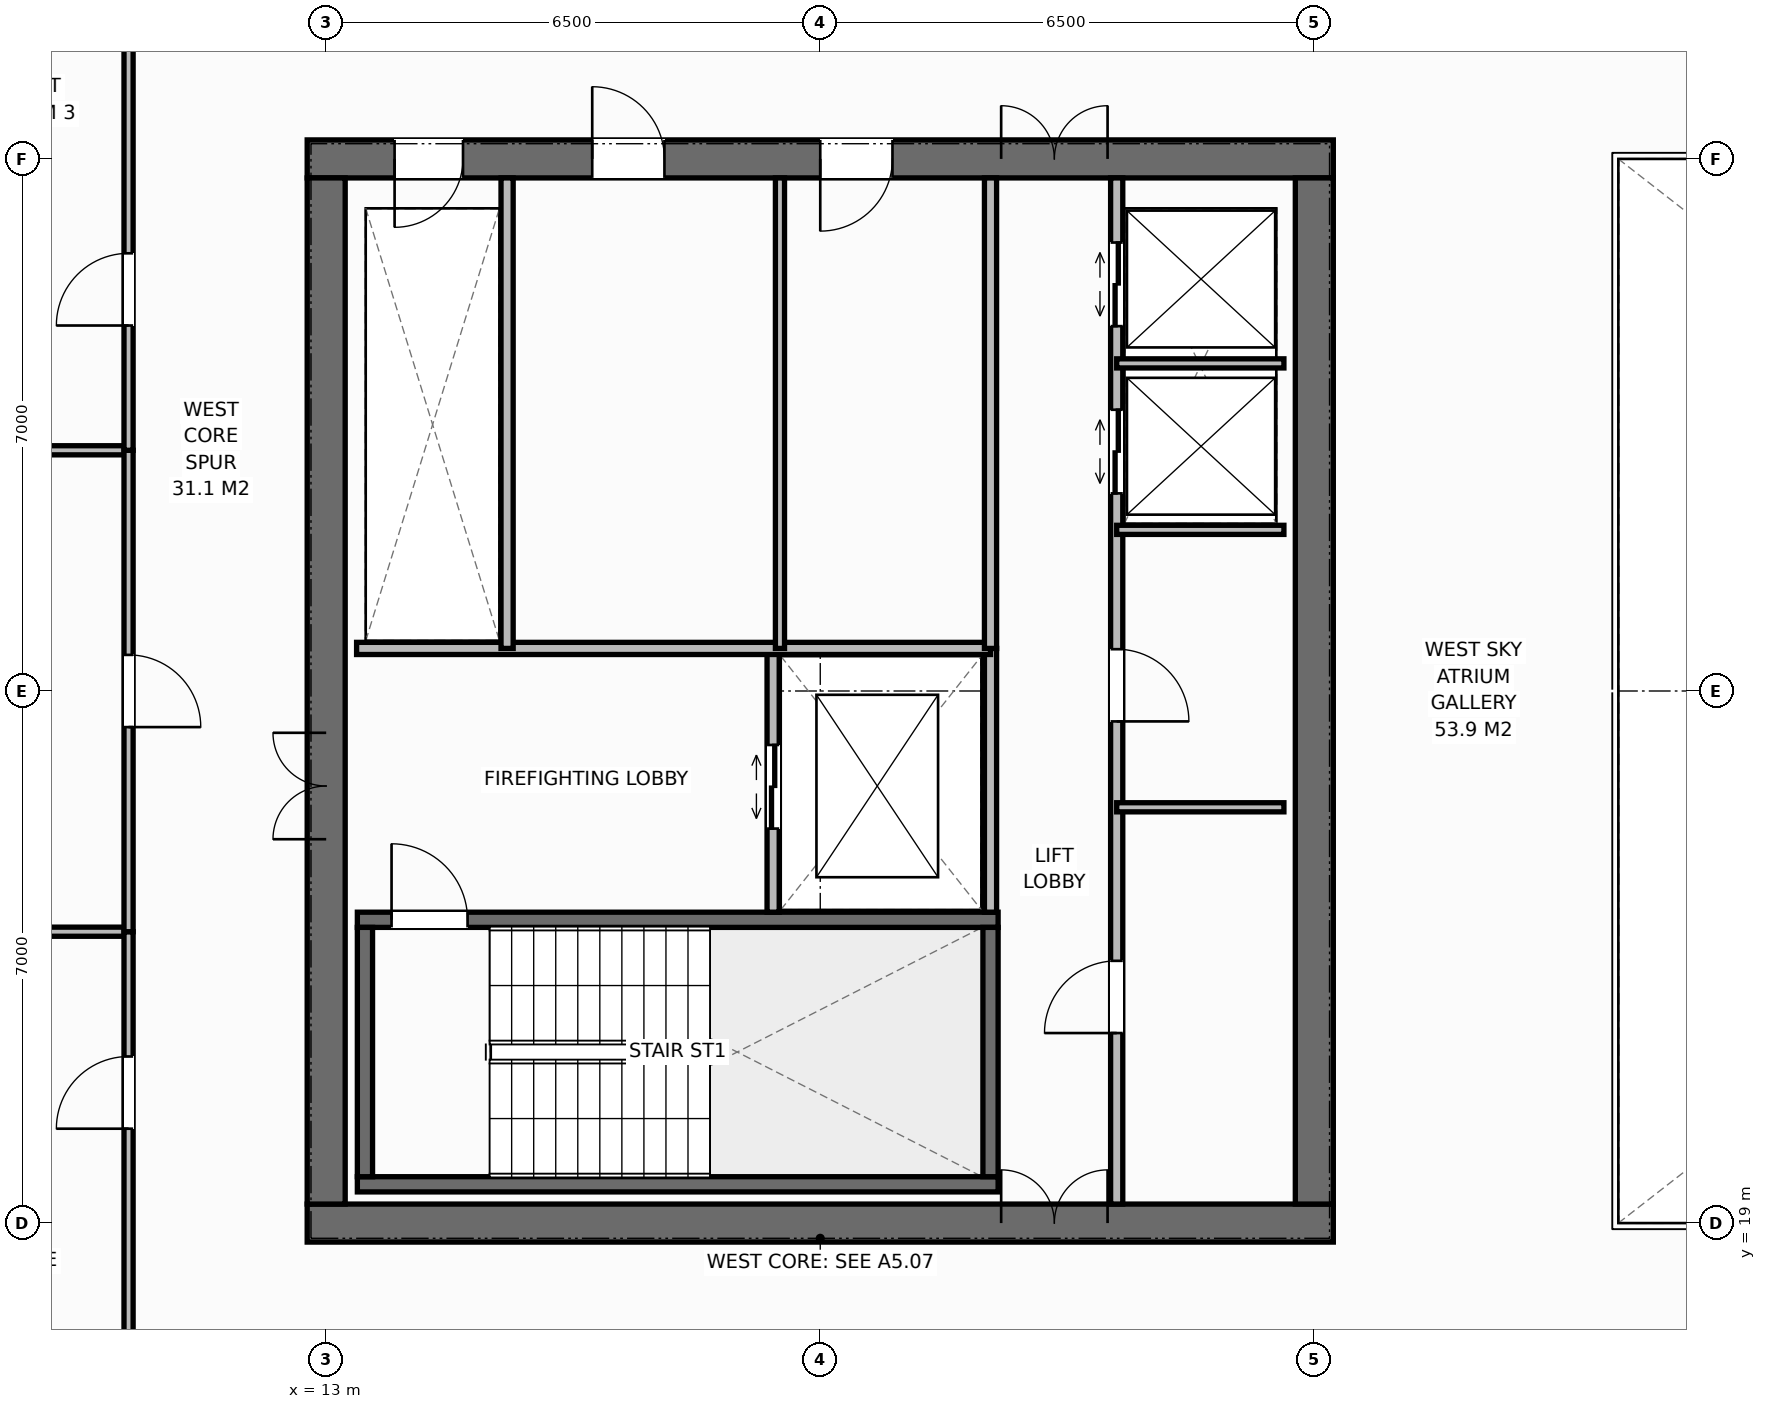
"""IFC4 building model, lengths in metres.
Left out: names, types, materials, properties, quantities, classifications, styles, units other than length and angle.
Written with IfcOpenShell. Run it as: python <this file> out.ifc"""

import sys

from ifc_helpers import new_model, si_unit, direction, frame, frame_2d, origin, place, context, subcontext, project, spatial, rectangle, extrude, element, fill, save


model = new_model("IFC4")
c1 = context("Model", 3, precision=1e-05, world=origin(), true_north=direction((0.0, 1.0)))
c2 = subcontext(c1, "Body", "Model", "MODEL_VIEW")
j1 = project(units=[si_unit("LENGTHUNIT", "METRE"), si_unit("PLANEANGLEUNIT", "RADIAN")], contexts=[c1])
p1 = place(None, origin())
s1 = spatial("IfcSite", under=j1, at=p1, CompositionType="ELEMENT")
p2 = place(p1, origin())
s2 = spatial("IfcBuilding", under=s1, at=p2, CompositionType="ELEMENT")
p3 = place(p2, frame((0.0, 0.0, 232.8)))
s3 = spatial("IfcBuildingStorey", under=s2, at=p3, CompositionType="ELEMENT", Elevation=232.8)
p4 = place(p3, frame((12.75, 19.0, 0.0), z_axis=(0.0, 0.0, 1.0), x_axis=(1.0, 0.0, 0.0)))
e1 = element("IfcWall", 1, at=p4, inside=s3, PredefinedType="SHEAR", context=c2, shape_type="SweptSolid", body=[
    extrude(rectangle(XDim=13.5, YDim=0.5, at=frame_2d((6.75, 0.0))), origin(), (0.0, 0.0, 1.0), 3.8),
])
p5 = place(p4, frame((9.13, 0.0, 0.0)))
e2 = element("IfcOpeningElement", 2, at=p5, cuts=e1, PredefinedType="OPENING", context=c2, shape_type="SweptSolid", body=[
    extrude(rectangle(XDim=1.4, YDim=2.2, at=frame_2d((0.7, 1.1))), frame((0.0, 0.26, 0.0), z_axis=(0.0, -1.0, 0.0), x_axis=(1.0, 0.0, 0.0)), (0.0, 0.0, 1.0), 0.52),
])
p6 = place(p3, frame((12.75, 33.0, 0.0), z_axis=(0.0, 0.0, 1.0), x_axis=(1.0, 0.0, 0.0)))
e3 = element("IfcWall", 3, at=p6, inside=s3, PredefinedType="SHEAR", context=c2, shape_type="SweptSolid", body=[
    extrude(rectangle(XDim=13.5, YDim=0.5, at=frame_2d((6.75, 0.0))), origin(), (0.0, 0.0, 1.0), 3.8),
])
p7 = place(p6, frame((1.15, 0.0, 0.0)))
e4 = element("IfcOpeningElement", 4, at=p7, cuts=e3, PredefinedType="OPENING", context=c2, shape_type="SweptSolid", body=[
    extrude(rectangle(XDim=0.9, YDim=2.15, at=frame_2d((0.45, 1.075))), frame((0.0, 0.26, 0.0), z_axis=(0.0, -1.0, 0.0), x_axis=(1.0, 0.0, 0.0)), (0.0, 0.0, 1.0), 0.52),
])
p8 = place(p6, frame((3.75, 0.0, 0.0)))
e5 = element("IfcOpeningElement", 5, at=p8, cuts=e3, PredefinedType="OPENING", context=c2, shape_type="SweptSolid", body=[
    extrude(rectangle(XDim=0.95, YDim=2.15, at=frame_2d((0.475, 1.075))), frame((0.0, 0.26, 0.0), z_axis=(0.0, -1.0, 0.0), x_axis=(1.0, 0.0, 0.0)), (0.0, 0.0, 1.0), 0.52),
])
p9 = place(p6, frame((6.75, 0.0, 0.0)))
e6 = element("IfcOpeningElement", 6, at=p9, cuts=e3, PredefinedType="OPENING", context=c2, shape_type="SweptSolid", body=[
    extrude(rectangle(XDim=0.95, YDim=2.15, at=frame_2d((0.475, 1.075))), frame((0.0, 0.26, 0.0), z_axis=(0.0, -1.0, 0.0), x_axis=(1.0, 0.0, 0.0)), (0.0, 0.0, 1.0), 0.52),
])
p10 = place(p6, frame((9.13, 0.0, 0.0)))
e7 = element("IfcOpeningElement", 7, at=p10, cuts=e3, PredefinedType="OPENING", context=c2, shape_type="SweptSolid", body=[
    extrude(rectangle(XDim=1.4, YDim=2.2, at=frame_2d((0.7, 1.1))), frame((0.0, 0.26, 0.0), z_axis=(0.0, -1.0, 0.0), x_axis=(1.0, 0.0, 0.0)), (0.0, 0.0, 1.0), 0.52),
])
p11 = place(p3, frame((13.0, 19.25, 0.0), z_axis=(0.0, 0.0, 1.0), x_axis=(0.0, 1.0, 0.0)))
e8 = element("IfcWall", 8, at=p11, inside=s3, PredefinedType="SHEAR", context=c2, shape_type="SweptSolid", body=[
    extrude(rectangle(XDim=13.5, YDim=0.5, at=frame_2d((6.75, 0.0))), origin(), (0.0, 0.0, 1.0), 3.8),
])
p12 = place(p11, frame((4.8, 0.0, 0.0)))
e9 = element("IfcOpeningElement", 9, at=p12, cuts=e8, PredefinedType="OPENING", context=c2, shape_type="SweptSolid", body=[
    extrude(rectangle(XDim=1.4, YDim=2.2, at=frame_2d((0.7, 1.1))), frame((0.0, 0.26, 0.0), z_axis=(0.0, -1.0, 0.0), x_axis=(1.0, 0.0, 0.0)), (0.0, 0.0, 1.0), 0.52),
])
p13 = place(p3, frame((26.0, 19.25, 0.0), z_axis=(0.0, 0.0, 1.0), x_axis=(0.0, 1.0, 0.0)))
e10 = element("IfcWall", 10, at=p13, inside=s3, PredefinedType="SHEAR", context=c2, shape_type="SweptSolid", body=[
    extrude(rectangle(XDim=13.5, YDim=0.5, at=frame_2d((6.75, 0.0))), origin(), (0.0, 0.0, 1.0), 3.8),
])
p14 = place(p3, frame((13.41, 19.51, 0.0), z_axis=(0.0, 0.0, 1.0), x_axis=(1.0, 0.0, 0.0)))
e11 = element("IfcWall", 11, at=p14, inside=s3, PredefinedType="SHEAR", context=c2, shape_type="SweptSolid", body=[
    extrude(rectangle(XDim=8.43, YDim=0.2, at=frame_2d((4.215, 0.0))), origin(), (0.0, 0.0, 1.0), 3.8),
])
p15 = place(p3, frame((13.41, 22.99, 0.0), z_axis=(0.0, 0.0, 1.0), x_axis=(1.0, 0.0, 0.0)))
e12 = element("IfcWall", 12, at=p15, inside=s3, PredefinedType="SHEAR", context=c2, shape_type="SweptSolid", body=[
    extrude(rectangle(XDim=8.43, YDim=0.2, at=frame_2d((4.215, 0.0))), origin(), (0.0, 0.0, 1.0), 3.8),
])
p16 = place(p15, frame((0.45, 0.0, 0.0)))
e13 = element("IfcOpeningElement", 13, at=p16, cuts=e12, PredefinedType="OPENING", context=c2, shape_type="SweptSolid", body=[
    extrude(rectangle(XDim=1.0, YDim=2.15, at=frame_2d((0.5, 1.075))), frame((0.0, 0.11, 0.0), z_axis=(0.0, -1.0, 0.0), x_axis=(1.0, 0.0, 0.0)), (0.0, 0.0, 1.0), 0.22),
])
for number, where, z_axis, x_axis in (
    (14, (13.51, 19.61, 0.0), (0.0, 0.0, 1.0), (0.0, 1.0, 0.0)),
    (15, (21.74, 19.61, 0.0), (0.0, 0.0, 1.0), (0.0, 1.0, 0.0)),
):
    element("IfcWall", number, at=place(p3, frame(where, z_axis=z_axis, x_axis=x_axis)), inside=s3, PredefinedType="SHEAR", context=c2, shape_type="SweptSolid", body=[
        extrude(rectangle(XDim=3.28, YDim=0.2, at=frame_2d((1.64, 0.0))), origin(), (0.0, 0.0, 1.0), 3.8),
    ])
p17 = place(p3, frame((21.74, 23.09, 0.0), z_axis=(0.0, 0.0, 1.0), x_axis=(0.0, 1.0, 0.0)))
e16 = element("IfcWall", 16, at=p17, inside=s3, PredefinedType="STANDARD", context=c2, shape_type="SweptSolid", body=[
    extrude(rectangle(XDim=3.47, YDim=0.16, at=frame_2d((1.735, 0.0))), origin(), (0.0, 0.0, 1.0), 3.58),
])
p18 = place(p3, frame((18.88, 23.09, 0.0), z_axis=(0.0, 0.0, 1.0), x_axis=(0.0, 1.0, 0.0)))
e17 = element("IfcWall", 17, at=p18, inside=s3, PredefinedType="STANDARD", context=c2, shape_type="SweptSolid", body=[
    extrude(rectangle(XDim=3.47, YDim=0.16, at=frame_2d((1.735, 0.0))), origin(), (0.0, 0.0, 1.0), 3.58),
])
p19 = place(p18, frame((1.1, 0.0, 0.0)))
e18 = element("IfcOpeningElement", 18, at=p19, cuts=e17, PredefinedType="OPENING", context=c2, shape_type="SweptSolid", body=[
    extrude(rectangle(XDim=1.1, YDim=2.2, at=frame_2d((0.55, 1.1))), frame((0.0, 0.09, 0.0), z_axis=(0.0, -1.0, 0.0), x_axis=(1.0, 0.0, 0.0)), (0.0, 0.0, 1.0), 0.18),
])
p20 = place(p3, frame((13.4, 26.56, 0.0), z_axis=(0.0, 0.0, 1.0), x_axis=(1.0, 0.0, 0.0)))
e19 = element("IfcWall", 19, at=p20, inside=s3, PredefinedType="STANDARD", context=c2, shape_type="SweptSolid", body=[
    extrude(rectangle(XDim=8.34, YDim=0.16, at=frame_2d((4.17, 0.0))), origin(), (0.0, 0.0, 1.0), 3.58),
])
p21 = place(p3, frame((15.38, 26.56, 0.0), z_axis=(0.0, 0.0, 1.0), x_axis=(0.0, 1.0, 0.0)))
e20 = element("IfcWall", 20, at=p21, inside=s3, PredefinedType="STANDARD", context=c2, shape_type="SweptSolid", body=[
    extrude(rectangle(XDim=6.19, YDim=0.16, at=frame_2d((3.095, 0.0))), origin(), (0.0, 0.0, 1.0), 3.58),
])
p22 = place(p3, frame((18.97, 26.56, 0.0), z_axis=(0.0, 0.0, 1.0), x_axis=(0.0, 1.0, 0.0)))
e21 = element("IfcWall", 21, at=p22, inside=s3, PredefinedType="PARTITIONING", context=c2, shape_type="SweptSolid", body=[
    extrude(rectangle(XDim=6.19, YDim=0.12, at=frame_2d((3.095, 0.0))), origin(), (0.0, 0.0, 1.0), 3.58),
])
p23 = place(p3, frame((21.74, 26.56, 0.0), z_axis=(0.0, 0.0, 1.0), x_axis=(0.0, 1.0, 0.0)))
e22 = element("IfcWall", 22, at=p23, inside=s3, PredefinedType="STANDARD", context=c2, shape_type="SweptSolid", body=[
    extrude(rectangle(XDim=6.19, YDim=0.16, at=frame_2d((3.095, 0.0))), origin(), (0.0, 0.0, 1.0), 3.58),
])
p24 = place(p3, frame((23.4, 19.25, 0.0), z_axis=(0.0, 0.0, 1.0), x_axis=(0.0, 1.0, 0.0)))
e23 = element("IfcWall", 23, at=p24, inside=s3, PredefinedType="STANDARD", context=c2, shape_type="SweptSolid", body=[
    extrude(rectangle(XDim=13.5, YDim=0.16, at=frame_2d((6.75, 0.0))), origin(), (0.0, 0.0, 1.0), 3.58),
])
p25 = place(p24, frame((2.25, 0.0, 0.0)))
e24 = element("IfcOpeningElement", 24, at=p25, cuts=e23, PredefinedType="OPENING", context=c2, shape_type="SweptSolid", body=[
    extrude(rectangle(XDim=0.95, YDim=2.15, at=frame_2d((0.475, 1.075))), frame((0.0, 0.09, 0.0), z_axis=(0.0, -1.0, 0.0), x_axis=(1.0, 0.0, 0.0)), (0.0, 0.0, 1.0), 0.18),
])
p26 = place(p24, frame((6.35, 0.0, 0.0)))
e25 = element("IfcOpeningElement", 25, at=p26, cuts=e23, PredefinedType="OPENING", context=c2, shape_type="SweptSolid", body=[
    extrude(rectangle(XDim=0.95, YDim=2.15, at=frame_2d((0.475, 1.075))), frame((0.0, 0.09, 0.0), z_axis=(0.0, -1.0, 0.0), x_axis=(1.0, 0.0, 0.0)), (0.0, 0.0, 1.0), 0.18),
])
p27 = place(p24, frame((9.35, 0.0, 0.0)))
e26 = element("IfcOpeningElement", 26, at=p27, cuts=e23, PredefinedType="OPENING", context=c2, shape_type="SweptSolid", body=[
    extrude(rectangle(XDim=1.1, YDim=2.2, at=frame_2d((0.55, 1.1))), frame((0.0, 0.09, 0.0), z_axis=(0.0, -1.0, 0.0), x_axis=(1.0, 0.0, 0.0)), (0.0, 0.0, 1.0), 0.18),
])
p28 = place(p24, frame((11.55, 0.0, 0.0)))
e27 = element("IfcOpeningElement", 27, at=p28, cuts=e23, PredefinedType="OPENING", context=c2, shape_type="SweptSolid", body=[
    extrude(rectangle(XDim=1.1, YDim=2.2, at=frame_2d((0.55, 1.1))), frame((0.0, 0.09, 0.0), z_axis=(0.0, -1.0, 0.0), x_axis=(1.0, 0.0, 0.0)), (0.0, 0.0, 1.0), 0.18),
])
for number, where, z_axis, x_axis in (
    (28, (23.4, 24.47, 0.0), (0.0, 0.0, 1.0), (1.0, 0.0, 0.0)),
    (29, (23.4, 28.12, 0.0), (0.0, 0.0, 1.0), (1.0, 0.0, 0.0)),
    (30, (23.4, 30.31, 0.0), (0.0, 0.0, 1.0), (1.0, 0.0, 0.0)),
):
    element("IfcWall", number, at=place(p3, frame(where, z_axis=z_axis, x_axis=x_axis)), inside=s3, PredefinedType="PARTITIONING", context=c2, shape_type="SweptSolid", body=[
        extrude(rectangle(XDim=2.2, YDim=0.12, at=frame_2d((1.1, 0.0))), origin(), (0.0, 0.0, 1.0), 3.58),
    ])
p29 = place(p3, frame((5.82, 22.833, 0.0), z_axis=(0.0, 0.0, 1.0), x_axis=(1.0, 0.0, 0.0)))
e31 = element("IfcWall", 31, at=p29, inside=s3, PredefinedType="PARTITIONING", context=c2, shape_type="SweptSolid", body=[
    extrude(rectangle(XDim=4.58, YDim=0.12, at=frame_2d((2.29, 0.0))), origin(), (0.0, 0.0, 1.0), 3.58),
])
p30 = place(p3, frame((10.4, 16.5, 0.0), z_axis=(0.0, 0.0, 1.0), x_axis=(0.0, 1.0, 0.0)))
e32 = element("IfcWall", 32, at=p30, inside=s3, PredefinedType="PARTITIONING", context=c2, shape_type="SweptSolid", body=[
    extrude(rectangle(XDim=6.333, YDim=0.12, at=frame_2d((3.167, 0.0))), origin(), (0.0, 0.0, 1.0), 3.58),
])
p31 = place(p30, frame((3.742, 0.0, 0.0)))
e33 = element("IfcOpeningElement", 33, at=p31, cuts=e32, PredefinedType="OPENING", context=c2, shape_type="SweptSolid", body=[
    extrude(rectangle(XDim=0.95, YDim=2.15, at=frame_2d((0.475, 1.075))), frame((0.0, 0.07, 0.0), z_axis=(0.0, -1.0, 0.0), x_axis=(1.0, 0.0, 0.0)), (0.0, 0.0, 1.0), 0.14),
])
p32 = place(p3, frame((5.82, 29.167, 0.0), z_axis=(0.0, 0.0, 1.0), x_axis=(1.0, 0.0, 0.0)))
e34 = element("IfcWall", 34, at=p32, inside=s3, PredefinedType="PARTITIONING", context=c2, shape_type="SweptSolid", body=[
    extrude(rectangle(XDim=4.58, YDim=0.12, at=frame_2d((2.29, 0.0))), origin(), (0.0, 0.0, 1.0), 3.58),
])
p33 = place(p3, frame((10.4, 22.833, 0.0), z_axis=(0.0, 0.0, 1.0), x_axis=(0.0, 1.0, 0.0)))
e35 = element("IfcWall", 35, at=p33, inside=s3, PredefinedType="PARTITIONING", context=c2, shape_type="SweptSolid", body=[
    extrude(rectangle(XDim=6.333, YDim=0.12, at=frame_2d((3.167, 0.0))), origin(), (0.0, 0.0, 1.0), 3.58),
])
p34 = place(p33, frame((2.692, 0.0, 0.0)))
e36 = element("IfcOpeningElement", 36, at=p34, cuts=e35, PredefinedType="OPENING", context=c2, shape_type="SweptSolid", body=[
    extrude(rectangle(XDim=0.95, YDim=2.15, at=frame_2d((0.475, 1.075))), frame((0.0, 0.07, 0.0), z_axis=(0.0, -1.0, 0.0), x_axis=(1.0, 0.0, 0.0)), (0.0, 0.0, 1.0), 0.14),
])
p35 = place(p3, frame((10.4, 29.167, 0.0), z_axis=(0.0, 0.0, 1.0), x_axis=(0.0, 1.0, 0.0)))
e37 = element("IfcWall", 37, at=p35, inside=s3, PredefinedType="PARTITIONING", context=c2, shape_type="SweptSolid", body=[
    extrude(rectangle(XDim=6.333, YDim=0.12, at=frame_2d((3.167, 0.0))), origin(), (0.0, 0.0, 1.0), 3.58),
])
p36 = place(p35, frame((1.642, 0.0, 0.0)))
e38 = element("IfcOpeningElement", 38, at=p36, cuts=e37, PredefinedType="OPENING", context=c2, shape_type="SweptSolid", body=[
    extrude(rectangle(XDim=0.95, YDim=2.15, at=frame_2d((0.475, 1.075))), frame((0.0, 0.07, 0.0), z_axis=(0.0, -1.0, 0.0), x_axis=(1.0, 0.0, 0.0)), (0.0, 0.0, 1.0), 0.14),
])
p37 = place(p16, origin())
e39 = element("IfcDoor", 39, at=p37, inside=s3, OperationType="SINGLE_SWING_LEFT", PredefinedType="DOOR", context=c2, shape_type="SweptSolid", body=[
    extrude(rectangle(XDim=1.0, YDim=2.15, at=frame_2d((0.5, 1.075))), frame((0.0, 0.025, 0.0), z_axis=(0.0, -1.0, 0.0), x_axis=(1.0, 0.0, 0.0)), (0.0, 0.0, 1.0), 0.05),
])
fill(e13, e39)
p38 = place(p12, origin())
e40 = element("IfcDoor", 40, at=p38, inside=s3, OperationType="DOUBLE_DOOR_SINGLE_SWING", PredefinedType="DOOR", context=c2, shape_type="SweptSolid", body=[
    extrude(rectangle(XDim=1.4, YDim=2.2, at=frame_2d((0.7, 1.1))), frame((0.0, 0.025, 0.0), z_axis=(0.0, -1.0, 0.0), x_axis=(1.0, 0.0, 0.0)), (0.0, 0.0, 1.0), 0.05),
])
fill(e9, e40)
p39 = place(p19, origin())
e41 = element("IfcDoor", 41, at=p39, inside=s3, OperationType="DOUBLE_DOOR_SLIDING", PredefinedType="DOOR", context=c2, shape_type="SweptSolid", body=[
    extrude(rectangle(XDim=1.1, YDim=2.2, at=frame_2d((0.55, 1.1))), frame((0.0, 0.025, 0.0), z_axis=(0.0, -1.0, 0.0), x_axis=(1.0, 0.0, 0.0)), (0.0, 0.0, 1.0), 0.05),
])
fill(e18, e41)
p40 = place(p7, origin())
e42 = element("IfcDoor", 42, at=p40, inside=s3, OperationType="SINGLE_SWING_RIGHT", PredefinedType="DOOR", context=c2, shape_type="SweptSolid", body=[
    extrude(rectangle(XDim=0.9, YDim=2.15, at=frame_2d((0.45, 1.075))), frame((0.0, -0.025, 0.0), z_axis=(0.0, -1.0, 0.0), x_axis=(1.0, 0.0, 0.0)), (0.0, 0.0, 1.0), 0.05),
])
fill(e4, e42)
p41 = place(p8, origin())
e43 = element("IfcDoor", 43, at=p41, inside=s3, OperationType="SINGLE_SWING_LEFT", PredefinedType="DOOR", context=c2, shape_type="SweptSolid", body=[
    extrude(rectangle(XDim=0.95, YDim=2.15, at=frame_2d((0.475, 1.075))), frame((0.0, -0.025, 0.0), z_axis=(0.0, -1.0, 0.0), x_axis=(1.0, 0.0, 0.0)), (0.0, 0.0, 1.0), 0.05),
])
fill(e5, e43)
p42 = place(p9, origin())
e44 = element("IfcDoor", 44, at=p42, inside=s3, OperationType="SINGLE_SWING_RIGHT", PredefinedType="DOOR", context=c2, shape_type="SweptSolid", body=[
    extrude(rectangle(XDim=0.95, YDim=2.15, at=frame_2d((0.475, 1.075))), frame((0.0, -0.025, 0.0), z_axis=(0.0, -1.0, 0.0), x_axis=(1.0, 0.0, 0.0)), (0.0, 0.0, 1.0), 0.05),
])
fill(e6, e44)
p43 = place(p5, origin())
e45 = element("IfcDoor", 45, at=p43, inside=s3, OperationType="DOUBLE_DOOR_SINGLE_SWING", PredefinedType="DOOR", context=c2, shape_type="SweptSolid", body=[
    extrude(rectangle(XDim=1.4, YDim=2.2, at=frame_2d((0.7, 1.1))), frame((0.0, 0.075, 0.0), z_axis=(0.0, -1.0, 0.0), x_axis=(1.0, 0.0, 0.0)), (0.0, 0.0, 1.0), 0.05),
])
fill(e2, e45)
p44 = place(p10, origin())
e46 = element("IfcDoor", 46, at=p44, inside=s3, OperationType="DOUBLE_DOOR_SINGLE_SWING", PredefinedType="DOOR", context=c2, shape_type="SweptSolid", body=[
    extrude(rectangle(XDim=1.4, YDim=2.2, at=frame_2d((0.7, 1.1))), frame((0.0, -0.025, 0.0), z_axis=(0.0, -1.0, 0.0), x_axis=(1.0, 0.0, 0.0)), (0.0, 0.0, 1.0), 0.05),
])
fill(e7, e46)
p45 = place(p25, origin())
e47 = element("IfcDoor", 47, at=p45, inside=s3, OperationType="SINGLE_SWING_LEFT", PredefinedType="DOOR", context=c2, shape_type="SweptSolid", body=[
    extrude(rectangle(XDim=0.95, YDim=2.15, at=frame_2d((0.475, 1.075))), frame((0.0, 0.025, 0.0), z_axis=(0.0, -1.0, 0.0), x_axis=(1.0, 0.0, 0.0)), (0.0, 0.0, 1.0), 0.05),
])
fill(e24, e47)
p46 = place(p26, origin())
e48 = element("IfcDoor", 48, at=p46, inside=s3, OperationType="SINGLE_SWING_RIGHT", PredefinedType="DOOR", context=c2, shape_type="SweptSolid", body=[
    extrude(rectangle(XDim=0.95, YDim=2.15, at=frame_2d((0.475, 1.075))), frame((0.0, 0.025, 0.0), z_axis=(0.0, -1.0, 0.0), x_axis=(1.0, 0.0, 0.0)), (0.0, 0.0, 1.0), 0.05),
])
fill(e25, e48)
p47 = place(p27, origin())
e49 = element("IfcDoor", 49, at=p47, inside=s3, OperationType="DOUBLE_DOOR_SLIDING", PredefinedType="DOOR", context=c2, shape_type="SweptSolid", body=[
    extrude(rectangle(XDim=1.1, YDim=2.2, at=frame_2d((0.55, 1.1))), frame((0.0, 0.025, 0.0), z_axis=(0.0, -1.0, 0.0), x_axis=(1.0, 0.0, 0.0)), (0.0, 0.0, 1.0), 0.05),
])
fill(e26, e49)
p48 = place(p28, origin())
e50 = element("IfcDoor", 50, at=p48, inside=s3, OperationType="DOUBLE_DOOR_SLIDING", PredefinedType="DOOR", context=c2, shape_type="SweptSolid", body=[
    extrude(rectangle(XDim=1.1, YDim=2.2, at=frame_2d((0.55, 1.1))), frame((0.0, 0.025, 0.0), z_axis=(0.0, -1.0, 0.0), x_axis=(1.0, 0.0, 0.0)), (0.0, 0.0, 1.0), 0.05),
])
fill(e27, e50)
p49 = place(p31, origin())
e51 = element("IfcDoor", 51, at=p49, inside=s3, OperationType="SINGLE_SWING_LEFT", PredefinedType="DOOR", context=c2, shape_type="SweptSolid", body=[
    extrude(rectangle(XDim=0.95, YDim=2.15, at=frame_2d((0.475, 1.075))), frame((0.0, 0.025, 0.0), z_axis=(0.0, -1.0, 0.0), x_axis=(1.0, 0.0, 0.0)), (0.0, 0.0, 1.0), 0.05),
])
fill(e33, e51)
p50 = place(p34, origin())
e52 = element("IfcDoor", 52, at=p50, inside=s3, OperationType="SINGLE_SWING_RIGHT", PredefinedType="DOOR", context=c2, shape_type="SweptSolid", body=[
    extrude(rectangle(XDim=0.95, YDim=2.15, at=frame_2d((0.475, 1.075))), frame((0.0, 0.025, 0.0), z_axis=(0.0, -1.0, 0.0), x_axis=(1.0, 0.0, 0.0)), (0.0, 0.0, 1.0), 0.05),
])
fill(e36, e52)
p51 = place(p36, origin())
e53 = element("IfcDoor", 53, at=p51, inside=s3, OperationType="SINGLE_SWING_LEFT", PredefinedType="DOOR", context=c2, shape_type="SweptSolid", body=[
    extrude(rectangle(XDim=0.95, YDim=2.15, at=frame_2d((0.475, 1.075))), frame((0.0, 0.025, 0.0), z_axis=(0.0, -1.0, 0.0), x_axis=(1.0, 0.0, 0.0)), (0.0, 0.0, 1.0), 0.05),
])
fill(e38, e53)
save(model, sys.argv[1])
